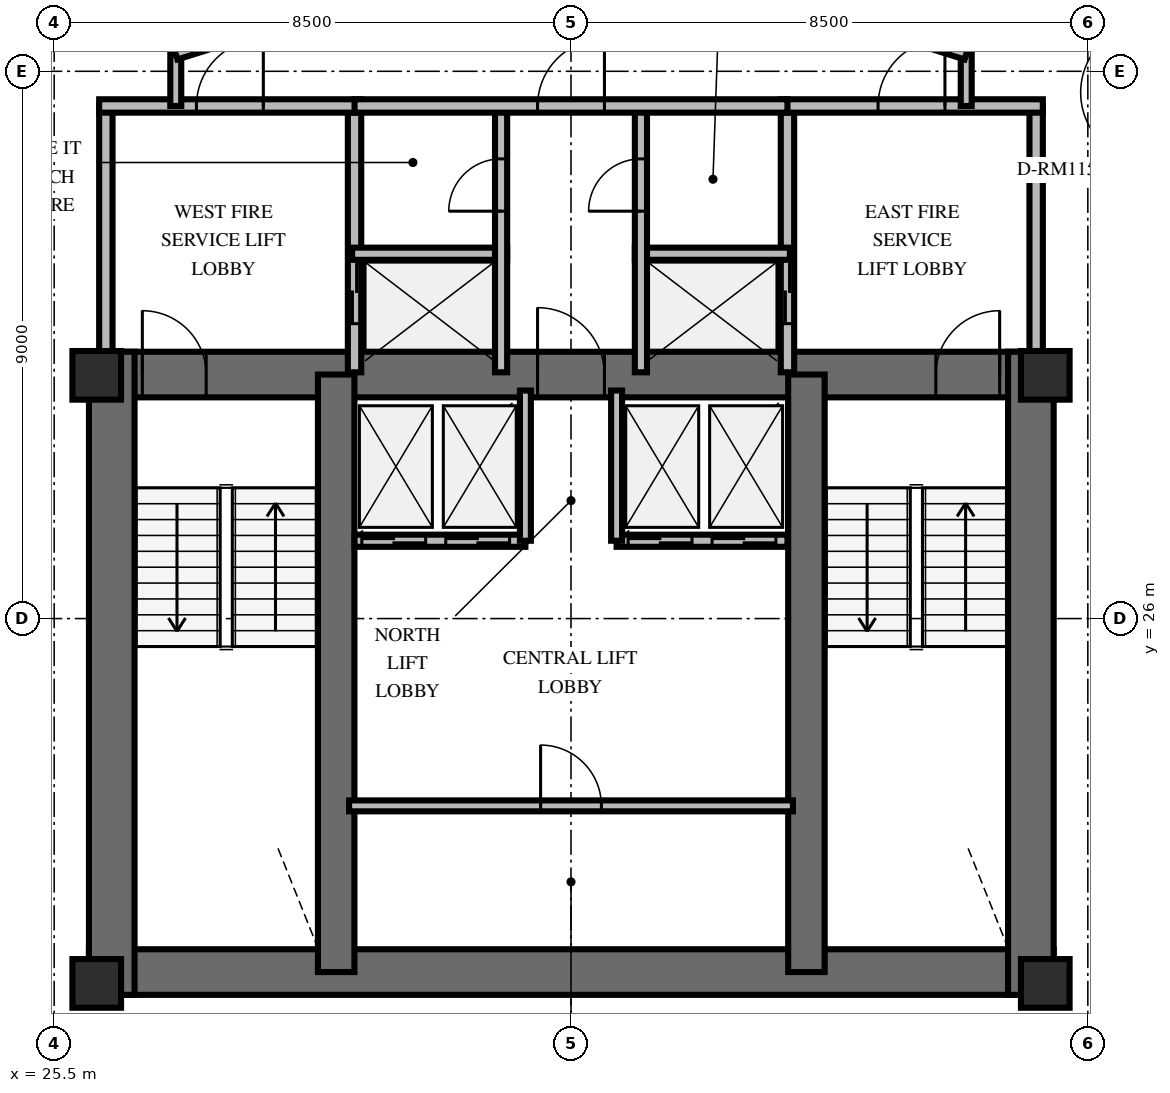
"""IFC4 building model, lengths in metres.
Left out: names, types, materials, properties, quantities, classifications, styles, units other than length and angle.
Written with IfcOpenShell. Run it as: python <this file> out.ifc"""

import sys

from ifc_helpers import new_model, si_unit, direction, frame, frame_2d, origin, origin_2d, place, context, subcontext, project, spatial, rectangle, extrude, element, fill, save


model = new_model("IFC4")
c1 = context("Model", 3, precision=1e-05, world=origin(), true_north=direction((0.0, 1.0)))
c2 = subcontext(c1, "Body", "Model", "MODEL_VIEW")
j1 = project(units=[si_unit("LENGTHUNIT", "METRE"), si_unit("PLANEANGLEUNIT", "RADIAN")], contexts=[c1])
p1 = place(None, origin())
s1 = spatial("IfcSite", under=j1, at=p1, CompositionType="ELEMENT")
p2 = place(p1, origin())
s2 = spatial("IfcBuilding", under=s1, at=p2, CompositionType="ELEMENT")
p3 = place(p2, frame((0.0, 0.0, 166.4)))
s3 = spatial("IfcBuildingStorey", under=s2, at=p3, CompositionType="ELEMENT", Elevation=166.4)
p4 = place(p3, frame((26.072, 20.187, 0.0), z_axis=(0.0, 0.0, 1.0), x_axis=(1.0, 0.0, 0.0)))
e1 = element("IfcWall", 1, at=p4, inside=s3, PredefinedType="SHEAR", context=c2, shape_type="SweptSolid", body=[
    extrude(rectangle(XDim=15.866, YDim=0.75, at=frame_2d((7.933, 0.0))), origin(), (0.0, 0.0, 1.0), 3.6),
])
p5 = place(p3, frame((26.072, 30.013, 0.0), z_axis=(0.0, 0.0, 1.0), x_axis=(1.0, 0.0, 0.0)))
e2 = element("IfcWall", 2, at=p5, inside=s3, PredefinedType="SHEAR", context=c2, shape_type="SweptSolid", body=[
    extrude(rectangle(XDim=15.866, YDim=0.75, at=frame_2d((7.933, 0.0))), origin(), (0.0, 0.0, 1.0), 3.6),
])
p6 = place(p5, frame((0.878, 0.0, 0.0)))
e3 = element("IfcOpeningElement", 3, at=p6, cuts=e2, PredefinedType="OPENING", context=c2, shape_type="SweptSolid", body=[
    extrude(rectangle(XDim=1.05, YDim=2.15, at=frame_2d((0.525, 1.075))), frame((0.0, 0.385, 0.0), z_axis=(0.0, -1.0, 0.0), x_axis=(1.0, 0.0, 0.0)), (0.0, 0.0, 1.0), 0.77),
])
p7 = place(p5, frame((13.928, 0.0, 0.0)))
e4 = element("IfcOpeningElement", 4, at=p7, cuts=e2, PredefinedType="OPENING", context=c2, shape_type="SweptSolid", body=[
    extrude(rectangle(XDim=1.05, YDim=2.15, at=frame_2d((0.525, 1.075))), frame((0.0, 0.385, 0.0), z_axis=(0.0, -1.0, 0.0), x_axis=(1.0, 0.0, 0.0)), (0.0, 0.0, 1.0), 0.77),
])
p8 = place(p5, frame((7.378, 0.0, 0.0)))
e5 = element("IfcOpeningElement", 5, at=p8, cuts=e2, PredefinedType="OPENING", context=c2, shape_type="SweptSolid", body=[
    extrude(rectangle(XDim=1.1, YDim=2.15, at=frame_2d((0.55, 1.075))), frame((0.0, 0.385, 0.0), z_axis=(0.0, -1.0, 0.0), x_axis=(1.0, 0.0, 0.0)), (0.0, 0.0, 1.0), 0.77),
])
for number, where, z_axis, x_axis in (
    (6, (26.447, 19.812, 0.0), (0.0, 0.0, 1.0), (0.0, 1.0, 0.0)),
    (7, (41.563, 19.812, 0.0), (0.0, 0.0, 1.0), (0.0, 1.0, 0.0)),
):
    element("IfcWall", number, at=place(p3, frame(where, z_axis=z_axis, x_axis=x_axis)), inside=s3, PredefinedType="SHEAR", context=c2, shape_type="SweptSolid", body=[
        extrude(rectangle(XDim=10.576, YDim=0.75, at=frame_2d((5.288, 0.0))), origin(), (0.0, 0.0, 1.0), 3.6),
    ])
for number, where, z_axis, x_axis in (
    (8, (30.138, 20.187, 0.0), (0.0, 0.0, 1.0), (0.0, 1.0, 0.0)),
    (9, (37.872, 20.187, 0.0), (0.0, 0.0, 1.0), (0.0, 1.0, 0.0)),
):
    element("IfcWall", number, at=place(p3, frame(where, z_axis=z_axis, x_axis=x_axis)), inside=s3, PredefinedType="SHEAR", context=c2, shape_type="SweptSolid", body=[
        extrude(rectangle(XDim=9.826, YDim=0.6, at=frame_2d((4.913, 0.0))), origin(), (0.0, 0.0, 1.0), 3.6),
    ])
for number, where, z_axis, x_axis in (
    (10, (26.2, 20.0, 0.0), (0.0, 0.0, 1.0), (1.0, 0.0, 0.0)),
    (11, (41.8, 20.0, 0.0), (0.0, 0.0, 1.0), (1.0, 0.0, 0.0)),
    (12, (26.2, 30.0, 0.0), (0.0, 0.0, 1.0), (1.0, 0.0, 0.0)),
    (13, (41.8, 30.0, 0.0), (0.0, 0.0, 1.0), (1.0, 0.0, 0.0)),
):
    element("IfcColumn", number, at=place(p3, frame(where, z_axis=z_axis, x_axis=x_axis)), inside=s3, PredefinedType="PILASTER", context=c2, shape_type="SweptSolid", body=[
        extrude(rectangle(XDim=0.8, YDim=0.8, at=origin_2d()), origin(), (0.0, 0.0, 1.0), 3.6),
    ])
p9 = place(p3, frame((26.35, 30.05, 0.0), z_axis=(0.0, 0.0, 1.0), x_axis=(0.0, 1.0, 0.0)))
e14 = element("IfcWall", 14, at=p9, inside=s3, PredefinedType="SOLIDWALL", context=c2, shape_type="SweptSolid", body=[
    extrude(rectangle(XDim=4.38, YDim=0.22, at=frame_2d((2.19, 0.0))), origin(), (0.0, 0.0, 1.0), 2.46),
])
p10 = place(p3, frame((30.44, 30.05, 0.0), z_axis=(0.0, 0.0, 1.0), x_axis=(0.0, 1.0, 0.0)))
e15 = element("IfcWall", 15, at=p10, inside=s3, PredefinedType="SOLIDWALL", context=c2, shape_type="SweptSolid", body=[
    extrude(rectangle(XDim=4.38, YDim=0.22, at=frame_2d((2.19, 0.0))), origin(), (0.0, 0.0, 1.0), 2.46),
])
p11 = place(p10, frame((0.8, 0.0, 0.0)))
e16 = element("IfcOpeningElement", 16, at=p11, cuts=e15, PredefinedType="OPENING", context=c2, shape_type="SweptSolid", body=[
    extrude(rectangle(XDim=1.05, YDim=2.1, at=frame_2d((0.525, 1.05))), frame((0.0, 0.12, 0.0), z_axis=(0.0, -1.0, 0.0), x_axis=(1.0, 0.0, 0.0)), (0.0, 0.0, 1.0), 0.24),
])
p12 = place(p3, frame((26.24, 34.43, 0.0), z_axis=(0.0, 0.0, 1.0), x_axis=(1.0, 0.0, 0.0)))
e17 = element("IfcWall", 17, at=p12, inside=s3, PredefinedType="SOLIDWALL", context=c2, shape_type="SweptSolid", body=[
    extrude(rectangle(XDim=4.31, YDim=0.22, at=frame_2d((2.155, 0.0))), origin(), (0.0, 0.0, 1.0), 2.46),
])
p13 = place(p12, frame((1.6, 0.0, 0.0)))
e18 = element("IfcOpeningElement", 18, at=p13, cuts=e17, PredefinedType="OPENING", context=c2, shape_type="SweptSolid", body=[
    extrude(rectangle(XDim=1.1, YDim=2.15, at=frame_2d((0.55, 1.075))), frame((0.0, 0.12, 0.0), z_axis=(0.0, -1.0, 0.0), x_axis=(1.0, 0.0, 0.0)), (0.0, 0.0, 1.0), 0.24),
])
p14 = place(p3, frame((30.4, 32.0, 0.0), z_axis=(0.0, 0.0, 1.0), x_axis=(1.0, 0.0, 0.0)))
e19 = element("IfcWall", 19, at=p14, inside=s3, PredefinedType="SOLIDWALL", context=c2, shape_type="SweptSolid", body=[
    extrude(rectangle(XDim=2.55, YDim=0.2, at=frame_2d((1.275, 0.0))), origin(), (0.0, 0.0, 1.0), 2.46),
])
p15 = place(p3, frame((32.85, 30.05, 0.0), z_axis=(0.0, 0.0, 1.0), x_axis=(0.0, 1.0, 0.0)))
e20 = element("IfcWall", 20, at=p15, inside=s3, PredefinedType="SOLIDWALL", context=c2, shape_type="SweptSolid", body=[
    extrude(rectangle(XDim=4.38, YDim=0.2, at=frame_2d((2.19, 0.0))), origin(), (0.0, 0.0, 1.0), 2.46),
])
p16 = place(p15, frame((2.65, 0.0, 0.0)))
e21 = element("IfcOpeningElement", 21, at=p16, cuts=e20, PredefinedType="OPENING", context=c2, shape_type="SweptSolid", body=[
    extrude(rectangle(XDim=0.86, YDim=2.05, at=frame_2d((0.43, 1.025))), frame((0.0, 0.11, 0.0), z_axis=(0.0, -1.0, 0.0), x_axis=(1.0, 0.0, 0.0)), (0.0, 0.0, 1.0), 0.22),
])
p17 = place(p3, frame((37.56, 30.05, 0.0), z_axis=(0.0, 0.0, 1.0), x_axis=(0.0, 1.0, 0.0)))
e22 = element("IfcWall", 22, at=p17, inside=s3, PredefinedType="SOLIDWALL", context=c2, shape_type="SweptSolid", body=[
    extrude(rectangle(XDim=4.38, YDim=0.22, at=frame_2d((2.19, 0.0))), origin(), (0.0, 0.0, 1.0), 2.46),
])
p18 = place(p17, frame((0.8, 0.0, 0.0)))
e23 = element("IfcOpeningElement", 23, at=p18, cuts=e22, PredefinedType="OPENING", context=c2, shape_type="SweptSolid", body=[
    extrude(rectangle(XDim=1.05, YDim=2.1, at=frame_2d((0.525, 1.05))), frame((0.0, 0.12, 0.0), z_axis=(0.0, -1.0, 0.0), x_axis=(1.0, 0.0, 0.0)), (0.0, 0.0, 1.0), 0.24),
])
p19 = place(p3, frame((41.65, 30.05, 0.0), z_axis=(0.0, 0.0, 1.0), x_axis=(0.0, 1.0, 0.0)))
e24 = element("IfcWall", 24, at=p19, inside=s3, PredefinedType="SOLIDWALL", context=c2, shape_type="SweptSolid", body=[
    extrude(rectangle(XDim=4.38, YDim=0.22, at=frame_2d((2.19, 0.0))), origin(), (0.0, 0.0, 1.0), 2.46),
])
p20 = place(p3, frame((37.45, 34.43, 0.0), z_axis=(0.0, 0.0, 1.0), x_axis=(1.0, 0.0, 0.0)))
e25 = element("IfcWall", 25, at=p20, inside=s3, PredefinedType="SOLIDWALL", context=c2, shape_type="SweptSolid", body=[
    extrude(rectangle(XDim=4.31, YDim=0.22, at=frame_2d((2.155, 0.0))), origin(), (0.0, 0.0, 1.0), 2.46),
])
p21 = place(p20, frame((1.6, 0.0, 0.0)))
e26 = element("IfcOpeningElement", 26, at=p21, cuts=e25, PredefinedType="OPENING", context=c2, shape_type="SweptSolid", body=[
    extrude(rectangle(XDim=1.1, YDim=2.15, at=frame_2d((0.55, 1.075))), frame((0.0, 0.12, 0.0), z_axis=(0.0, -1.0, 0.0), x_axis=(1.0, 0.0, 0.0)), (0.0, 0.0, 1.0), 0.24),
])
p22 = place(p3, frame((35.05, 32.0, 0.0), z_axis=(0.0, 0.0, 1.0), x_axis=(1.0, 0.0, 0.0)))
e27 = element("IfcWall", 27, at=p22, inside=s3, PredefinedType="SOLIDWALL", context=c2, shape_type="SweptSolid", body=[
    extrude(rectangle(XDim=2.55, YDim=0.2, at=frame_2d((1.275, 0.0))), origin(), (0.0, 0.0, 1.0), 2.46),
])
p23 = place(p3, frame((35.15, 30.05, 0.0), z_axis=(0.0, 0.0, 1.0), x_axis=(0.0, 1.0, 0.0)))
e28 = element("IfcWall", 28, at=p23, inside=s3, PredefinedType="SOLIDWALL", context=c2, shape_type="SweptSolid", body=[
    extrude(rectangle(XDim=4.38, YDim=0.2, at=frame_2d((2.19, 0.0))), origin(), (0.0, 0.0, 1.0), 2.46),
])
p24 = place(p23, frame((2.65, 0.0, 0.0)))
e29 = element("IfcOpeningElement", 29, at=p24, cuts=e28, PredefinedType="OPENING", context=c2, shape_type="SweptSolid", body=[
    extrude(rectangle(XDim=0.86, YDim=2.05, at=frame_2d((0.43, 1.025))), frame((0.0, 0.11, 0.0), z_axis=(0.0, -1.0, 0.0), x_axis=(1.0, 0.0, 0.0)), (0.0, 0.0, 1.0), 0.22),
])
p25 = place(p3, frame((30.44, 34.43, 0.0), z_axis=(0.0, 0.0, 1.0), x_axis=(1.0, 0.0, 0.0)))
e30 = element("IfcWall", 30, at=p25, inside=s3, PredefinedType="SOLIDWALL", context=c2, shape_type="SweptSolid", body=[
    extrude(rectangle(XDim=7.12, YDim=0.22, at=frame_2d((3.56, 0.0))), origin(), (0.0, 0.0, 1.0), 2.46),
])
p26 = place(p25, frame((3.01, 0.0, 0.0)))
e31 = element("IfcOpeningElement", 31, at=p26, cuts=e30, PredefinedType="OPENING", context=c2, shape_type="SweptSolid", body=[
    extrude(rectangle(XDim=1.1, YDim=2.15, at=frame_2d((0.55, 1.075))), frame((0.0, 0.12, 0.0), z_axis=(0.0, -1.0, 0.0), x_axis=(1.0, 0.0, 0.0)), (0.0, 0.0, 1.0), 0.24),
])
p27 = place(p3, frame((30.35, 22.92, 0.0), z_axis=(0.0, 0.0, 1.0), x_axis=(1.0, 0.0, 0.0)))
e32 = element("IfcWall", 32, at=p27, inside=s3, PredefinedType="PARTITIONING", context=c2, shape_type="SweptSolid", body=[
    extrude(rectangle(XDim=7.3, YDim=0.18, at=frame_2d((3.65, 0.0))), origin(), (0.0, 0.0, 1.0), 2.46),
])
p28 = place(p27, frame((3.15, 0.0, 0.0)))
e33 = element("IfcOpeningElement", 33, at=p28, cuts=e32, PredefinedType="OPENING", context=c2, shape_type="SweptSolid", body=[
    extrude(rectangle(XDim=1.0, YDim=2.15, at=frame_2d((0.5, 1.075))), frame((0.0, 0.1, 0.0), z_axis=(0.0, -1.0, 0.0), x_axis=(1.0, 0.0, 0.0)), (0.0, 0.0, 1.0), 0.2),
])
p29 = place(p3, frame((30.44, 27.28, 0.0), z_axis=(0.0, 0.0, 1.0), x_axis=(1.0, 0.0, 0.0)))
e34 = element("IfcWall", 34, at=p29, inside=s3, PredefinedType="SOLIDWALL", context=c2, shape_type="SweptSolid", body=[
    extrude(rectangle(XDim=2.81, YDim=0.2, at=frame_2d((1.405, 0.0))), origin(), (0.0, 0.0, 1.0), 2.46),
])
p30 = place(p29, frame((0.12, 0.0, 0.0)))
e35 = element("IfcOpeningElement", 35, at=p30, cuts=e34, PredefinedType="OPENING", context=c2, shape_type="SweptSolid", body=[
    extrude(rectangle(XDim=1.05, YDim=2.1, at=frame_2d((0.525, 1.05))), frame((0.0, 0.11, 0.0), z_axis=(0.0, -1.0, 0.0), x_axis=(1.0, 0.0, 0.0)), (0.0, 0.0, 1.0), 0.22),
])
p31 = place(p29, frame((1.5, 0.0, 0.0)))
e36 = element("IfcOpeningElement", 36, at=p31, cuts=e34, PredefinedType="OPENING", context=c2, shape_type="SweptSolid", body=[
    extrude(rectangle(XDim=1.05, YDim=2.1, at=frame_2d((0.525, 1.05))), frame((0.0, 0.11, 0.0), z_axis=(0.0, -1.0, 0.0), x_axis=(1.0, 0.0, 0.0)), (0.0, 0.0, 1.0), 0.22),
])
p32 = place(p3, frame((33.25, 27.28, 0.0), z_axis=(0.0, 0.0, 1.0), x_axis=(0.0, 1.0, 0.0)))
e37 = element("IfcWall", 37, at=p32, inside=s3, PredefinedType="SOLIDWALL", context=c2, shape_type="SweptSolid", body=[
    extrude(rectangle(XDim=2.47, YDim=0.18, at=frame_2d((1.235, 0.0))), origin(), (0.0, 0.0, 1.0), 2.46),
])
p33 = place(p3, frame((34.75, 27.28, 0.0), z_axis=(0.0, 0.0, 1.0), x_axis=(1.0, 0.0, 0.0)))
e38 = element("IfcWall", 38, at=p33, inside=s3, PredefinedType="SOLIDWALL", context=c2, shape_type="SweptSolid", body=[
    extrude(rectangle(XDim=2.81, YDim=0.2, at=frame_2d((1.405, 0.0))), origin(), (0.0, 0.0, 1.0), 2.46),
])
p34 = place(p33, frame((0.19, 0.0, 0.0)))
e39 = element("IfcOpeningElement", 39, at=p34, cuts=e38, PredefinedType="OPENING", context=c2, shape_type="SweptSolid", body=[
    extrude(rectangle(XDim=1.05, YDim=2.1, at=frame_2d((0.525, 1.05))), frame((0.0, 0.11, 0.0), z_axis=(0.0, -1.0, 0.0), x_axis=(1.0, 0.0, 0.0)), (0.0, 0.0, 1.0), 0.22),
])
p35 = place(p33, frame((1.57, 0.0, 0.0)))
e40 = element("IfcOpeningElement", 40, at=p35, cuts=e38, PredefinedType="OPENING", context=c2, shape_type="SweptSolid", body=[
    extrude(rectangle(XDim=1.05, YDim=2.1, at=frame_2d((0.525, 1.05))), frame((0.0, 0.11, 0.0), z_axis=(0.0, -1.0, 0.0), x_axis=(1.0, 0.0, 0.0)), (0.0, 0.0, 1.0), 0.22),
])
p36 = place(p3, frame((34.75, 27.28, 0.0), z_axis=(0.0, 0.0, 1.0), x_axis=(0.0, 1.0, 0.0)))
e41 = element("IfcWall", 41, at=p36, inside=s3, PredefinedType="SOLIDWALL", context=c2, shape_type="SweptSolid", body=[
    extrude(rectangle(XDim=2.47, YDim=0.18, at=frame_2d((1.235, 0.0))), origin(), (0.0, 0.0, 1.0), 2.46),
])
for number, where, z_axis, x_axis in (
    (42, (27.5, 34.43, 0.0), (0.0, 0.0, 1.0), (0.0, 1.0, 0.0)),
    (43, (40.5, 35.28, 0.0), (0.0, 0.0, 1.0), (0.0, -1.0, 0.0)),
):
    element("IfcWall", number, at=place(p3, frame(where, z_axis=z_axis, x_axis=x_axis)), inside=s3, PredefinedType="PARTITIONING", context=c2, shape_type="SweptSolid", body=[
        extrude(rectangle(XDim=0.85, YDim=0.18, at=frame_2d((0.425, 0.0))), origin(), (0.0, 0.0, 1.0), 2.46),
    ])
p37 = place(p3, frame((27.5, 35.28, 0.0), z_axis=(0.0, 0.0, 1.0), x_axis=(0.953691418528, 0.300786765376, 0.0)))
e44 = element("IfcWall", 44, at=p37, inside=s3, PredefinedType="PARTITIONING", context=c2, shape_type="SweptSolid", body=[
    extrude(rectangle(XDim=6.816, YDim=0.18, at=frame_2d((3.408, 0.0))), origin(), (0.0, 0.0, 1.0), 2.46),
])
p38 = place(p37, frame((2.858, 0.0, 0.0)))
e45 = element("IfcOpeningElement", 45, at=p38, cuts=e44, PredefinedType="OPENING", context=c2, shape_type="SweptSolid", body=[
    extrude(rectangle(XDim=1.1, YDim=2.15, at=frame_2d((0.55, 1.075))), frame((0.0, 0.1, 0.0), z_axis=(0.0, -1.0, 0.0), x_axis=(1.0, 0.0, 0.0)), (0.0, 0.0, 1.0), 0.2),
])
p39 = place(p3, frame((34.0, 37.33, 0.0), z_axis=(0.0, 0.0, 1.0), x_axis=(0.953691418528, -0.300786765376, 0.0)))
e46 = element("IfcWall", 46, at=p39, inside=s3, PredefinedType="PARTITIONING", context=c2, shape_type="SweptSolid", body=[
    extrude(rectangle(XDim=6.816, YDim=0.18, at=frame_2d((3.408, 0.0))), origin(), (0.0, 0.0, 1.0), 2.46),
])
p40 = place(p39, frame((2.858, 0.0, 0.0)))
e47 = element("IfcOpeningElement", 47, at=p40, cuts=e46, PredefinedType="OPENING", context=c2, shape_type="SweptSolid", body=[
    extrude(rectangle(XDim=1.1, YDim=2.15, at=frame_2d((0.55, 1.075))), frame((0.0, 0.1, 0.0), z_axis=(0.0, -1.0, 0.0), x_axis=(1.0, 0.0, 0.0)), (0.0, 0.0, 1.0), 0.2),
])
p41 = place(p3, frame((45.162, 32.8, 0.0), z_axis=(0.0, 0.0, 1.0), x_axis=(-0.660626682452, 0.750714583869, 0.0)))
e48 = element("IfcWall", 48, at=p41, inside=s3, PredefinedType="PARTITIONING", context=c2, shape_type="SweptSolid", body=[
    extrude(rectangle(XDim=4.539, YDim=0.18, at=frame_2d((2.27, 0.0))), origin(), (0.0, 0.0, 1.0), 2.46),
])
p42 = place(p41, frame((2.467, 0.0, 0.0)))
e49 = element("IfcOpeningElement", 49, at=p42, cuts=e48, PredefinedType="OPENING", context=c2, shape_type="SweptSolid", body=[
    extrude(rectangle(XDim=1.15, YDim=2.15, at=frame_2d((0.575, 1.075))), frame((0.0, 0.1, 0.0), z_axis=(0.0, -1.0, 0.0), x_axis=(1.0, 0.0, 0.0)), (0.0, 0.0, 1.0), 0.2),
])
p43 = place(p6, origin())
e50 = element("IfcDoor", 50, at=p43, inside=s3, OperationType="SINGLE_SWING_LEFT", PredefinedType="DOOR", context=c2, shape_type="SweptSolid", body=[
    extrude(rectangle(XDim=1.05, YDim=2.15, at=frame_2d((0.525, 1.075))), frame((0.0, 0.025, 0.0), z_axis=(0.0, -1.0, 0.0), x_axis=(1.0, 0.0, 0.0)), (0.0, 0.0, 1.0), 0.05),
])
fill(e3, e50)
p44 = place(p7, origin())
e51 = element("IfcDoor", 51, at=p44, inside=s3, OperationType="SINGLE_SWING_RIGHT", PredefinedType="DOOR", context=c2, shape_type="SweptSolid", body=[
    extrude(rectangle(XDim=1.05, YDim=2.15, at=frame_2d((0.525, 1.075))), frame((0.0, 0.025, 0.0), z_axis=(0.0, -1.0, 0.0), x_axis=(1.0, 0.0, 0.0)), (0.0, 0.0, 1.0), 0.05),
])
fill(e4, e51)
p45 = place(p8, origin())
e52 = element("IfcDoor", 52, at=p45, inside=s3, OperationType="SINGLE_SWING_LEFT", PredefinedType="DOOR", context=c2, shape_type="SweptSolid", body=[
    extrude(rectangle(XDim=1.1, YDim=2.15, at=frame_2d((0.55, 1.075))), frame((0.0, 0.025, 0.0), z_axis=(0.0, -1.0, 0.0), x_axis=(1.0, 0.0, 0.0)), (0.0, 0.0, 1.0), 0.05),
])
fill(e5, e52)
p46 = place(p13, origin())
e53 = element("IfcDoor", 53, at=p46, inside=s3, OperationType="SINGLE_SWING_RIGHT", PredefinedType="DOOR", context=c2, shape_type="SweptSolid", body=[
    extrude(rectangle(XDim=1.1, YDim=2.15, at=frame_2d((0.55, 1.075))), frame((0.0, 0.025, 0.0), z_axis=(0.0, -1.0, 0.0), x_axis=(1.0, 0.0, 0.0)), (0.0, 0.0, 1.0), 0.05),
])
fill(e18, e53)
p47 = place(p11, origin())
e54 = element("IfcDoor", 54, at=p47, inside=s3, OperationType="DOUBLE_DOOR_SLIDING", PredefinedType="USERDEFINED", context=c2, shape_type="SweptSolid", body=[
    extrude(rectangle(XDim=1.05, YDim=2.1, at=frame_2d((0.525, 1.05))), frame((0.0, 0.025, 0.0), z_axis=(0.0, -1.0, 0.0), x_axis=(1.0, 0.0, 0.0)), (0.0, 0.0, 1.0), 0.05),
])
fill(e16, e54)
p48 = place(p16, origin())
e55 = element("IfcDoor", 55, at=p48, inside=s3, OperationType="SINGLE_SWING_LEFT", PredefinedType="TRAPDOOR", context=c2, shape_type="SweptSolid", body=[
    extrude(rectangle(XDim=0.86, YDim=2.05, at=frame_2d((0.43, 1.025))), frame((0.0, 0.025, 0.0), z_axis=(0.0, -1.0, 0.0), x_axis=(1.0, 0.0, 0.0)), (0.0, 0.0, 1.0), 0.05),
])
fill(e21, e55)
p49 = place(p21, origin())
e56 = element("IfcDoor", 56, at=p49, inside=s3, OperationType="SINGLE_SWING_RIGHT", PredefinedType="DOOR", context=c2, shape_type="SweptSolid", body=[
    extrude(rectangle(XDim=1.1, YDim=2.15, at=frame_2d((0.55, 1.075))), frame((0.0, 0.025, 0.0), z_axis=(0.0, -1.0, 0.0), x_axis=(1.0, 0.0, 0.0)), (0.0, 0.0, 1.0), 0.05),
])
fill(e26, e56)
p50 = place(p18, origin())
e57 = element("IfcDoor", 57, at=p50, inside=s3, OperationType="DOUBLE_DOOR_SLIDING", PredefinedType="USERDEFINED", context=c2, shape_type="SweptSolid", body=[
    extrude(rectangle(XDim=1.05, YDim=2.1, at=frame_2d((0.525, 1.05))), frame((0.0, 0.025, 0.0), z_axis=(0.0, -1.0, 0.0), x_axis=(1.0, 0.0, 0.0)), (0.0, 0.0, 1.0), 0.05),
])
fill(e23, e57)
p51 = place(p24, origin())
e58 = element("IfcDoor", 58, at=p51, inside=s3, OperationType="SINGLE_SWING_LEFT", PredefinedType="TRAPDOOR", context=c2, shape_type="SweptSolid", body=[
    extrude(rectangle(XDim=0.86, YDim=2.05, at=frame_2d((0.43, 1.025))), frame((0.0, 0.025, 0.0), z_axis=(0.0, -1.0, 0.0), x_axis=(1.0, 0.0, 0.0)), (0.0, 0.0, 1.0), 0.05),
])
fill(e29, e58)
p52 = place(p26, origin())
e59 = element("IfcDoor", 59, at=p52, inside=s3, OperationType="SINGLE_SWING_RIGHT", PredefinedType="DOOR", context=c2, shape_type="SweptSolid", body=[
    extrude(rectangle(XDim=1.1, YDim=2.15, at=frame_2d((0.55, 1.075))), frame((0.0, 0.025, 0.0), z_axis=(0.0, -1.0, 0.0), x_axis=(1.0, 0.0, 0.0)), (0.0, 0.0, 1.0), 0.05),
])
fill(e31, e59)
p53 = place(p28, origin())
e60 = element("IfcDoor", 60, at=p53, inside=s3, OperationType="SINGLE_SWING_LEFT", PredefinedType="DOOR", context=c2, shape_type="SweptSolid", body=[
    extrude(rectangle(XDim=1.0, YDim=2.15, at=frame_2d((0.5, 1.075))), frame((0.0, 0.025, 0.0), z_axis=(0.0, -1.0, 0.0), x_axis=(1.0, 0.0, 0.0)), (0.0, 0.0, 1.0), 0.05),
])
fill(e33, e60)
p54 = place(p30, origin())
e61 = element("IfcDoor", 61, at=p54, inside=s3, OperationType="DOUBLE_DOOR_SLIDING", PredefinedType="USERDEFINED", context=c2, shape_type="SweptSolid", body=[
    extrude(rectangle(XDim=1.05, YDim=2.1, at=frame_2d((0.525, 1.05))), frame((0.0, 0.025, 0.0), z_axis=(0.0, -1.0, 0.0), x_axis=(1.0, 0.0, 0.0)), (0.0, 0.0, 1.0), 0.05),
])
fill(e35, e61)
p55 = place(p31, origin())
e62 = element("IfcDoor", 62, at=p55, inside=s3, OperationType="DOUBLE_DOOR_SLIDING", PredefinedType="USERDEFINED", context=c2, shape_type="SweptSolid", body=[
    extrude(rectangle(XDim=1.05, YDim=2.1, at=frame_2d((0.525, 1.05))), frame((0.0, 0.025, 0.0), z_axis=(0.0, -1.0, 0.0), x_axis=(1.0, 0.0, 0.0)), (0.0, 0.0, 1.0), 0.05),
])
fill(e36, e62)
p56 = place(p34, origin())
e63 = element("IfcDoor", 63, at=p56, inside=s3, OperationType="DOUBLE_DOOR_SLIDING", PredefinedType="USERDEFINED", context=c2, shape_type="SweptSolid", body=[
    extrude(rectangle(XDim=1.05, YDim=2.1, at=frame_2d((0.525, 1.05))), frame((0.0, 0.025, 0.0), z_axis=(0.0, -1.0, 0.0), x_axis=(1.0, 0.0, 0.0)), (0.0, 0.0, 1.0), 0.05),
])
fill(e39, e63)
p57 = place(p35, origin())
e64 = element("IfcDoor", 64, at=p57, inside=s3, OperationType="DOUBLE_DOOR_SLIDING", PredefinedType="USERDEFINED", context=c2, shape_type="SweptSolid", body=[
    extrude(rectangle(XDim=1.05, YDim=2.1, at=frame_2d((0.525, 1.05))), frame((0.0, 0.025, 0.0), z_axis=(0.0, -1.0, 0.0), x_axis=(1.0, 0.0, 0.0)), (0.0, 0.0, 1.0), 0.05),
])
fill(e40, e64)
save(model, sys.argv[1])
